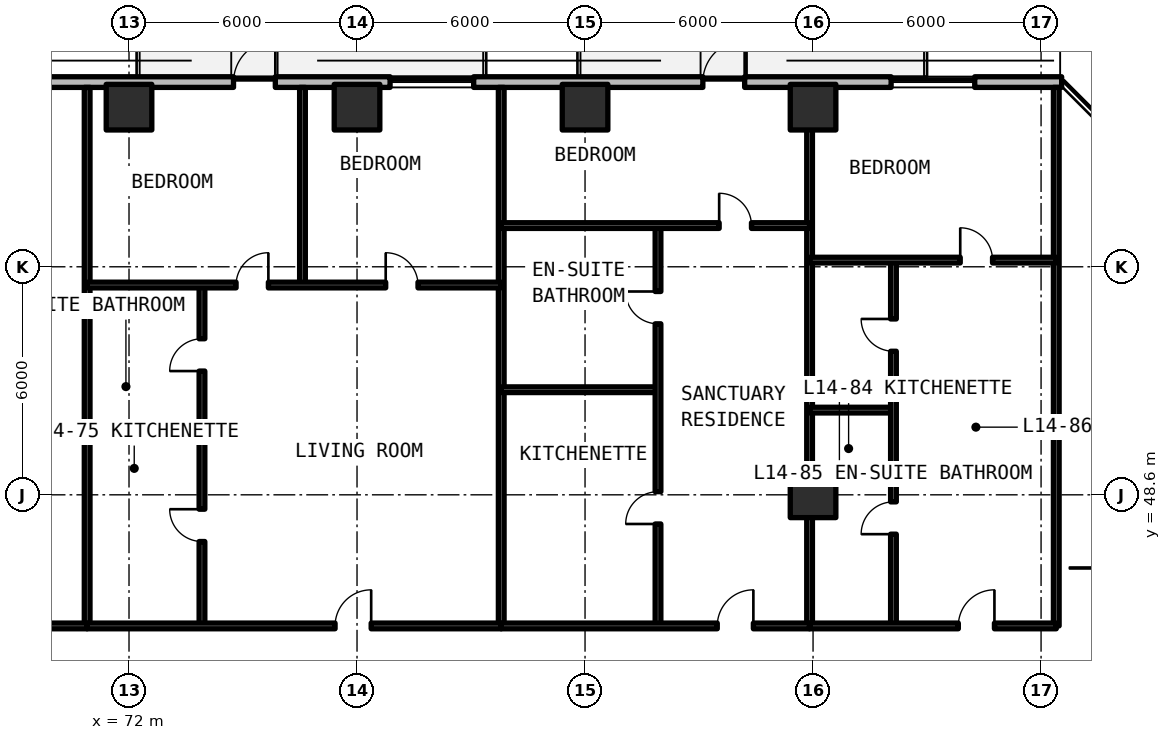
"""IFC4 building model, lengths in metres.
Left out: names, types, materials, properties, quantities, classifications, styles, units other than length and angle.
Written with IfcOpenShell. Run it as: python <this file> out.ifc"""

import sys

from ifc_helpers import new_model, si_unit, direction, frame, frame_2d, origin, origin_2d, place, context, subcontext, project, spatial, rectangle, extrude, element, fill, save


model = new_model("IFC4")
c1 = context("Model", 3, precision=1e-05, world=origin(), true_north=direction((0.0, 1.0)))
c2 = subcontext(c1, "Body", "Model", "MODEL_VIEW")
j1 = project(units=[si_unit("LENGTHUNIT", "METRE"), si_unit("PLANEANGLEUNIT", "RADIAN")], contexts=[c1])
p1 = place(None, origin())
s1 = spatial("IfcSite", under=j1, at=p1, CompositionType="ELEMENT")
p2 = place(p1, origin())
s2 = spatial("IfcBuilding", under=s1, at=p2, CompositionType="ELEMENT")
p3 = place(p2, frame((0.0, 0.0, 52.14)))
s3 = spatial("IfcBuildingStorey", under=s2, at=p3, CompositionType="ELEMENT", Elevation=52.14)
for number, where, z_axis, x_axis in (
    (1, (90.0, 48.6, 0.0), (0.0, 0.0, 1.0), (1.0, 0.0, 0.0)),
    (2, (72.0, 58.8, 0.0), (0.0, 0.0, 1.0), (1.0, 0.0, 0.0)),
    (3, (78.0, 58.8, 0.0), (0.0, 0.0, 1.0), (1.0, 0.0, 0.0)),
    (4, (84.0, 58.8, 0.0), (0.0, 0.0, 1.0), (1.0, 0.0, 0.0)),
    (5, (90.0, 58.8, 0.0), (0.0, 0.0, 1.0), (1.0, 0.0, 0.0)),
):
    element("IfcColumn", number, at=place(p3, frame(where, z_axis=z_axis, x_axis=x_axis)), inside=s3, PredefinedType="COLUMN", context=c2, shape_type="SweptSolid", body=[
        extrude(rectangle(XDim=1.2, YDim=1.2, at=origin_2d()), origin(), (0.0, 0.0, 1.0), 3.3),
    ])
p4 = place(p3, frame((96.542, 59.46, 0.0), z_axis=(0.0, 0.0, 1.0), x_axis=(-1.0, 0.0, 0.0)))
e6 = element("IfcWall", 6, at=p4, inside=s3, PredefinedType="SOLIDWALL", context=c2, shape_type="SweptSolid", body=[
    extrude(rectangle(XDim=44.402, YDim=0.28, at=frame_2d((22.201, 0.0))), origin(), (0.0, 0.0, 1.0), 3.08),
])
p5 = place(p4, frame((32.292, 0.0, 0.0)))
e7 = element("IfcOpeningElement", 7, at=p5, cuts=e6, PredefinedType="OPENING", context=c2, shape_type="SweptSolid", body=[
    extrude(rectangle(XDim=1.1, YDim=2.15, at=frame_2d((0.55, 1.075))), frame((0.0, 0.15, 0.0), z_axis=(0.0, -1.0, 0.0), x_axis=(1.0, 0.0, 0.0)), (0.0, 0.0, 1.0), 0.3),
])
p6 = place(p4, frame((20.692, 0.0, 0.0)))
e8 = element("IfcOpeningElement", 8, at=p6, cuts=e6, PredefinedType="OPENING", context=c2, shape_type="SweptSolid", body=[
    extrude(rectangle(XDim=1.1, YDim=2.15, at=frame_2d((0.55, 1.075))), frame((0.0, 0.15, 0.0), z_axis=(0.0, -1.0, 0.0), x_axis=(1.0, 0.0, 0.0)), (0.0, 0.0, 1.0), 0.3),
])
p7 = place(p4, frame((8.342, 0.0, 0.0)))
e9 = element("IfcOpeningElement", 9, at=p7, cuts=e6, PredefinedType="OPENING", context=c2, shape_type="SweptSolid", body=[
    extrude(rectangle(XDim=1.1, YDim=2.15, at=frame_2d((0.55, 1.075))), frame((0.0, 0.15, 0.0), z_axis=(0.0, -1.0, 0.0), x_axis=(1.0, 0.0, 0.0)), (0.0, 0.0, 1.0), 0.3),
])
p8 = place(p4, frame((39.502, 0.0, 0.78)))
e10 = element("IfcOpeningElement", 10, at=p8, cuts=e6, PredefinedType="OPENING", context=c2, shape_type="SweptSolid", body=[
    extrude(rectangle(XDim=2.2, YDim=1.66, at=frame_2d((1.1, 0.83))), frame((0.0, 0.15, 0.0), z_axis=(0.0, -1.0, 0.0), x_axis=(1.0, 0.0, 0.0)), (0.0, 0.0, 1.0), 0.3),
])
p9 = place(p4, frame((34.821, 0.0, 0.78)))
e11 = element("IfcOpeningElement", 11, at=p9, cuts=e6, PredefinedType="OPENING", context=c2, shape_type="SweptSolid", body=[
    extrude(rectangle(XDim=0.85, YDim=1.65, at=frame_2d((0.425, 0.825))), frame((0.0, 0.15, 0.0), z_axis=(0.0, -1.0, 0.0), x_axis=(1.0, 0.0, 0.0)), (0.0, 0.0, 1.0), 0.3),
])
p10 = place(p4, frame((15.472, 0.0, 0.78)))
e12 = element("IfcOpeningElement", 12, at=p10, cuts=e6, PredefinedType="OPENING", context=c2, shape_type="SweptSolid", body=[
    extrude(rectangle(XDim=2.2, YDim=1.66, at=frame_2d((1.1, 0.83))), frame((0.0, 0.15, 0.0), z_axis=(0.0, -1.0, 0.0), x_axis=(1.0, 0.0, 0.0)), (0.0, 0.0, 1.0), 0.3),
])
p11 = place(p4, frame((2.288, 0.0, 0.78)))
e13 = element("IfcOpeningElement", 13, at=p11, cuts=e6, PredefinedType="OPENING", context=c2, shape_type="SweptSolid", body=[
    extrude(rectangle(XDim=2.2, YDim=1.66, at=frame_2d((1.1, 0.83))), frame((0.0, 0.15, 0.0), z_axis=(0.0, -1.0, 0.0), x_axis=(1.0, 0.0, 0.0)), (0.0, 0.0, 1.0), 0.3),
])
for number, where, z_axis, x_axis in (
    (14, (96.4, 45.15, 0.0), (0.0, 0.0, 1.0), (0.0, 1.0, 0.0)),
    (15, (70.898, 45.15, 0.0), (0.0, 0.0, 1.0), (0.0, 1.0, 0.0)),
):
    element("IfcWall", number, at=place(p3, frame(where, z_axis=z_axis, x_axis=x_axis)), inside=s3, PredefinedType="SOLIDWALL", context=c2, shape_type="SweptSolid", body=[
        extrude(rectangle(XDim=14.17, YDim=0.15, at=frame_2d((7.085, 0.0))), origin(), (0.0, 0.0, 1.0), 2.35),
    ])
p12 = place(p3, frame((62.552, 45.15, 0.0), z_axis=(0.0, 0.0, 1.0), x_axis=(1.0, 0.0, 0.0)))
e16 = element("IfcWall", 16, at=p12, inside=s3, PredefinedType="SOLIDWALL", context=c2, shape_type="SweptSolid", body=[
    extrude(rectangle(XDim=8.346, YDim=0.15, at=frame_2d((4.173, 0.0))), origin(), (0.0, 0.0, 1.0), 2.35),
])
p13 = place(p12, frame((3.623, 0.0, 0.0)))
e17 = element("IfcOpeningElement", 17, at=p13, cuts=e16, PredefinedType="OPENING", context=c2, shape_type="SweptSolid", body=[
    extrude(rectangle(XDim=1.1, YDim=2.15, at=frame_2d((0.55, 1.075))), frame((0.0, 0.085, 0.0), z_axis=(0.0, -1.0, 0.0), x_axis=(1.0, 0.0, 0.0)), (0.0, 0.0, 1.0), 0.17),
])
p14 = place(p3, frame((81.795, 45.15, 0.0), z_axis=(0.0, 0.0, 1.0), x_axis=(0.0, 1.0, 0.0)))
e18 = element("IfcWall", 18, at=p14, inside=s3, PredefinedType="SOLIDWALL", context=c2, shape_type="SweptSolid", body=[
    extrude(rectangle(XDim=14.17, YDim=0.15, at=frame_2d((7.085, 0.0))), origin(), (0.0, 0.0, 1.0), 2.35),
])
p15 = place(p3, frame((70.898, 50.442, 0.0), z_axis=(0.0, 0.0, 1.0), x_axis=(1.0, 0.0, 0.0)))
e19 = element("IfcWall", 19, at=p15, inside=s3, PredefinedType="PARTITIONING", context=c2, shape_type="SweptSolid", body=[
    extrude(rectangle(XDim=3.021, YDim=0.15, at=frame_2d((1.511, 0.0))), origin(), (0.0, 0.0, 1.0), 2.35),
])
p16 = place(p3, frame((73.92, 45.15, 0.0), z_axis=(0.0, 0.0, 1.0), x_axis=(0.0, 1.0, 0.0)))
e20 = element("IfcWall", 20, at=p16, inside=s3, PredefinedType="PARTITIONING", context=c2, shape_type="SweptSolid", body=[
    extrude(rectangle(XDim=8.97, YDim=0.15, at=frame_2d((4.485, 0.0))), origin(), (0.0, 0.0, 1.0), 2.35),
])
p17 = place(p16, frame((2.221, 0.0, 0.0)))
e21 = element("IfcOpeningElement", 21, at=p17, cuts=e20, PredefinedType="OPENING", context=c2, shape_type="SweptSolid", body=[
    extrude(rectangle(XDim=0.85, YDim=2.1, at=frame_2d((0.425, 1.05))), frame((0.0, 0.085, 0.0), z_axis=(0.0, -1.0, 0.0), x_axis=(1.0, 0.0, 0.0)), (0.0, 0.0, 1.0), 0.17),
])
p18 = place(p16, frame((6.706, 0.0, 0.0)))
e22 = element("IfcOpeningElement", 22, at=p18, cuts=e20, PredefinedType="OPENING", context=c2, shape_type="SweptSolid", body=[
    extrude(rectangle(XDim=0.85, YDim=2.1, at=frame_2d((0.425, 1.05))), frame((0.0, 0.085, 0.0), z_axis=(0.0, -1.0, 0.0), x_axis=(1.0, 0.0, 0.0)), (0.0, 0.0, 1.0), 0.17),
])
p19 = place(p3, frame((76.564, 54.12, 0.0), z_axis=(0.0, 0.0, 1.0), x_axis=(0.0, 1.0, 0.0)))
e23 = element("IfcWall", 23, at=p19, inside=s3, PredefinedType="PARTITIONING", context=c2, shape_type="SweptSolid", body=[
    extrude(rectangle(XDim=5.2, YDim=0.15, at=frame_2d((2.6, 0.0))), origin(), (0.0, 0.0, 1.0), 2.35),
])
p20 = place(p3, frame((70.898, 54.12, 0.0), z_axis=(0.0, 0.0, 1.0), x_axis=(1.0, 0.0, 0.0)))
e24 = element("IfcWall", 24, at=p20, inside=s3, PredefinedType="PARTITIONING", context=c2, shape_type="SweptSolid", body=[
    extrude(rectangle(XDim=10.896, YDim=0.15, at=frame_2d((5.448, 0.0))), origin(), (0.0, 0.0, 1.0), 2.35),
])
p21 = place(p20, frame((3.919, 0.0, 0.0)))
e25 = element("IfcOpeningElement", 25, at=p21, cuts=e24, PredefinedType="OPENING", context=c2, shape_type="SweptSolid", body=[
    extrude(rectangle(XDim=0.85, YDim=2.1, at=frame_2d((0.425, 1.05))), frame((0.0, 0.085, 0.0), z_axis=(0.0, -1.0, 0.0), x_axis=(1.0, 0.0, 0.0)), (0.0, 0.0, 1.0), 0.17),
])
p22 = place(p20, frame((7.856, 0.0, 0.0)))
e26 = element("IfcOpeningElement", 26, at=p22, cuts=e24, PredefinedType="OPENING", context=c2, shape_type="SweptSolid", body=[
    extrude(rectangle(XDim=0.85, YDim=2.1, at=frame_2d((0.425, 1.05))), frame((0.0, 0.085, 0.0), z_axis=(0.0, -1.0, 0.0), x_axis=(1.0, 0.0, 0.0)), (0.0, 0.0, 1.0), 0.17),
])
p23 = place(p3, frame((70.898, 45.15, 0.0), z_axis=(0.0, 0.0, 1.0), x_axis=(1.0, 0.0, 0.0)))
e27 = element("IfcWall", 27, at=p23, inside=s3, PredefinedType="SOLIDWALL", context=c2, shape_type="SweptSolid", body=[
    extrude(rectangle(XDim=10.896, YDim=0.15, at=frame_2d((5.448, 0.0))), origin(), (0.0, 0.0, 1.0), 2.35),
])
p24 = place(p23, frame((6.524, 0.0, 0.0)))
e28 = element("IfcOpeningElement", 28, at=p24, cuts=e27, PredefinedType="OPENING", context=c2, shape_type="SweptSolid", body=[
    extrude(rectangle(XDim=0.95, YDim=2.15, at=frame_2d((0.475, 1.075))), frame((0.0, 0.085, 0.0), z_axis=(0.0, -1.0, 0.0), x_axis=(1.0, 0.0, 0.0)), (0.0, 0.0, 1.0), 0.17),
])
p25 = place(p3, frame((89.909, 45.15, 0.0), z_axis=(0.0, 0.0, 1.0), x_axis=(0.0, 1.0, 0.0)))
e29 = element("IfcWall", 29, at=p25, inside=s3, PredefinedType="SOLIDWALL", context=c2, shape_type="SweptSolid", body=[
    extrude(rectangle(XDim=14.17, YDim=0.15, at=frame_2d((7.085, 0.0))), origin(), (0.0, 0.0, 1.0), 2.35),
])
p26 = place(p3, frame((81.795, 51.365, 0.0), z_axis=(0.0, 0.0, 1.0), x_axis=(1.0, 0.0, 0.0)))
e30 = element("IfcWall", 30, at=p26, inside=s3, PredefinedType="PARTITIONING", context=c2, shape_type="SweptSolid", body=[
    extrude(rectangle(XDim=4.125, YDim=0.15, at=frame_2d((2.062, 0.0))), origin(), (0.0, 0.0, 1.0), 2.35),
])
p27 = place(p3, frame((85.92, 45.15, 0.0), z_axis=(0.0, 0.0, 1.0), x_axis=(0.0, 1.0, 0.0)))
e31 = element("IfcWall", 31, at=p27, inside=s3, PredefinedType="PARTITIONING", context=c2, shape_type="SweptSolid", body=[
    extrude(rectangle(XDim=10.534, YDim=0.15, at=frame_2d((5.267, 0.0))), origin(), (0.0, 0.0, 1.0), 2.35),
])
p28 = place(p27, frame((2.683, 0.0, 0.0)))
e32 = element("IfcOpeningElement", 32, at=p28, cuts=e31, PredefinedType="OPENING", context=c2, shape_type="SweptSolid", body=[
    extrude(rectangle(XDim=0.85, YDim=2.1, at=frame_2d((0.425, 1.05))), frame((0.0, 0.085, 0.0), z_axis=(0.0, -1.0, 0.0), x_axis=(1.0, 0.0, 0.0)), (0.0, 0.0, 1.0), 0.17),
])
p29 = place(p27, frame((7.95, 0.0, 0.0)))
e33 = element("IfcOpeningElement", 33, at=p29, cuts=e31, PredefinedType="OPENING", context=c2, shape_type="SweptSolid", body=[
    extrude(rectangle(XDim=0.85, YDim=2.1, at=frame_2d((0.425, 1.05))), frame((0.0, 0.085, 0.0), z_axis=(0.0, -1.0, 0.0), x_axis=(1.0, 0.0, 0.0)), (0.0, 0.0, 1.0), 0.17),
])
p30 = place(p3, frame((81.795, 55.684, 0.0), z_axis=(0.0, 0.0, 1.0), x_axis=(1.0, 0.0, 0.0)))
e34 = element("IfcWall", 34, at=p30, inside=s3, PredefinedType="PARTITIONING", context=c2, shape_type="SweptSolid", body=[
    extrude(rectangle(XDim=8.114, YDim=0.15, at=frame_2d((4.057, 0.0))), origin(), (0.0, 0.0, 1.0), 2.35),
])
p31 = place(p30, frame((5.735, 0.0, 0.0)))
e35 = element("IfcOpeningElement", 35, at=p31, cuts=e34, PredefinedType="OPENING", context=c2, shape_type="SweptSolid", body=[
    extrude(rectangle(XDim=0.85, YDim=2.1, at=frame_2d((0.425, 1.05))), frame((0.0, 0.085, 0.0), z_axis=(0.0, -1.0, 0.0), x_axis=(1.0, 0.0, 0.0)), (0.0, 0.0, 1.0), 0.17),
])
p32 = place(p3, frame((81.795, 45.15, 0.0), z_axis=(0.0, 0.0, 1.0), x_axis=(1.0, 0.0, 0.0)))
e36 = element("IfcWall", 36, at=p32, inside=s3, PredefinedType="SOLIDWALL", context=c2, shape_type="SweptSolid", body=[
    extrude(rectangle(XDim=8.114, YDim=0.15, at=frame_2d((4.057, 0.0))), origin(), (0.0, 0.0, 1.0), 2.35),
])
p33 = place(p32, frame((5.685, 0.0, 0.0)))
e37 = element("IfcOpeningElement", 37, at=p33, cuts=e36, PredefinedType="OPENING", context=c2, shape_type="SweptSolid", body=[
    extrude(rectangle(XDim=0.95, YDim=2.15, at=frame_2d((0.475, 1.075))), frame((0.0, 0.085, 0.0), z_axis=(0.0, -1.0, 0.0), x_axis=(1.0, 0.0, 0.0)), (0.0, 0.0, 1.0), 0.17),
])
p34 = place(p3, frame((89.909, 50.829, 0.0), z_axis=(0.0, 0.0, 1.0), x_axis=(1.0, 0.0, 0.0)))
e38 = element("IfcWall", 38, at=p34, inside=s3, PredefinedType="PARTITIONING", context=c2, shape_type="SweptSolid", body=[
    extrude(rectangle(XDim=2.207, YDim=0.15, at=frame_2d((1.104, 0.0))), origin(), (0.0, 0.0, 1.0), 2.35),
])
p35 = place(p3, frame((92.116, 45.15, 0.0), z_axis=(0.0, 0.0, 1.0), x_axis=(0.0, 1.0, 0.0)))
e39 = element("IfcWall", 39, at=p35, inside=s3, PredefinedType="PARTITIONING", context=c2, shape_type="SweptSolid", body=[
    extrude(rectangle(XDim=9.625, YDim=0.15, at=frame_2d((4.813, 0.0))), origin(), (0.0, 0.0, 1.0), 2.35),
])
p36 = place(p35, frame((2.415, 0.0, 0.0)))
e40 = element("IfcOpeningElement", 40, at=p36, cuts=e39, PredefinedType="OPENING", context=c2, shape_type="SweptSolid", body=[
    extrude(rectangle(XDim=0.85, YDim=2.1, at=frame_2d((0.425, 1.05))), frame((0.0, 0.085, 0.0), z_axis=(0.0, -1.0, 0.0), x_axis=(1.0, 0.0, 0.0)), (0.0, 0.0, 1.0), 0.17),
])
p37 = place(p35, frame((7.227, 0.0, 0.0)))
e41 = element("IfcOpeningElement", 41, at=p37, cuts=e39, PredefinedType="OPENING", context=c2, shape_type="SweptSolid", body=[
    extrude(rectangle(XDim=0.85, YDim=2.1, at=frame_2d((0.425, 1.05))), frame((0.0, 0.085, 0.0), z_axis=(0.0, -1.0, 0.0), x_axis=(1.0, 0.0, 0.0)), (0.0, 0.0, 1.0), 0.17),
])
p38 = place(p3, frame((89.909, 54.775, 0.0), z_axis=(0.0, 0.0, 1.0), x_axis=(1.0, 0.0, 0.0)))
e42 = element("IfcWall", 42, at=p38, inside=s3, PredefinedType="PARTITIONING", context=c2, shape_type="SweptSolid", body=[
    extrude(rectangle(XDim=6.491, YDim=0.15, at=frame_2d((3.246, 0.0))), origin(), (0.0, 0.0, 1.0), 2.35),
])
p39 = place(p38, frame((3.964, 0.0, 0.0)))
e43 = element("IfcOpeningElement", 43, at=p39, cuts=e42, PredefinedType="OPENING", context=c2, shape_type="SweptSolid", body=[
    extrude(rectangle(XDim=0.85, YDim=2.1, at=frame_2d((0.425, 1.05))), frame((0.0, 0.085, 0.0), z_axis=(0.0, -1.0, 0.0), x_axis=(1.0, 0.0, 0.0)), (0.0, 0.0, 1.0), 0.17),
])
p40 = place(p3, frame((89.909, 45.15, 0.0), z_axis=(0.0, 0.0, 1.0), x_axis=(1.0, 0.0, 0.0)))
e44 = element("IfcWall", 44, at=p40, inside=s3, PredefinedType="SOLIDWALL", context=c2, shape_type="SweptSolid", body=[
    extrude(rectangle(XDim=6.491, YDim=0.15, at=frame_2d((3.246, 0.0))), origin(), (0.0, 0.0, 1.0), 2.35),
])
p41 = place(p40, frame((3.914, 0.0, 0.0)))
e45 = element("IfcOpeningElement", 45, at=p41, cuts=e44, PredefinedType="OPENING", context=c2, shape_type="SweptSolid", body=[
    extrude(rectangle(XDim=0.95, YDim=2.15, at=frame_2d((0.475, 1.075))), frame((0.0, 0.085, 0.0), z_axis=(0.0, -1.0, 0.0), x_axis=(1.0, 0.0, 0.0)), (0.0, 0.0, 1.0), 0.17),
])
p42 = place(p6, frame((1.1, 0.0, 0.0), z_axis=(0.0, 0.0, 1.0), x_axis=(-1.0, 0.0, 0.0)))
e46 = element("IfcDoor", 46, at=p42, inside=s3, OperationType="SINGLE_SWING_RIGHT", PredefinedType="DOOR", context=c2, shape_type="SweptSolid", body=[
    extrude(rectangle(XDim=1.1, YDim=2.15, at=frame_2d((0.55, 1.075))), frame((0.0, 0.025, 0.0), z_axis=(0.0, -1.0, 0.0), x_axis=(1.0, 0.0, 0.0)), (0.0, 0.0, 1.0), 0.05),
])
fill(e8, e46)
p43 = place(p7, frame((1.1, 0.0, 0.0), z_axis=(0.0, 0.0, 1.0), x_axis=(-1.0, 0.0, 0.0)))
e47 = element("IfcDoor", 47, at=p43, inside=s3, OperationType="SINGLE_SWING_LEFT", PredefinedType="DOOR", context=c2, shape_type="SweptSolid", body=[
    extrude(rectangle(XDim=1.1, YDim=2.15, at=frame_2d((0.55, 1.075))), frame((0.0, 0.025, 0.0), z_axis=(0.0, -1.0, 0.0), x_axis=(1.0, 0.0, 0.0)), (0.0, 0.0, 1.0), 0.05),
])
fill(e9, e47)
p44 = place(p10, origin())
e48 = element("IfcWindow", 48, at=p44, inside=s3, PartitioningType="SINGLE_PANEL", PredefinedType="WINDOW", context=c2, shape_type="SweptSolid", body=[
    extrude(rectangle(XDim=2.2, YDim=1.66, at=frame_2d((1.1, 0.83))), frame((0.0, 0.03, 0.0), z_axis=(0.0, -1.0, 0.0), x_axis=(1.0, 0.0, 0.0)), (0.0, 0.0, 1.0), 0.06),
])
fill(e12, e48)
p45 = place(p11, origin())
e49 = element("IfcWindow", 49, at=p45, inside=s3, PartitioningType="SINGLE_PANEL", PredefinedType="WINDOW", context=c2, shape_type="SweptSolid", body=[
    extrude(rectangle(XDim=2.2, YDim=1.66, at=frame_2d((1.1, 0.83))), frame((0.0, 0.03, 0.0), z_axis=(0.0, -1.0, 0.0), x_axis=(1.0, 0.0, 0.0)), (0.0, 0.0, 1.0), 0.06),
])
fill(e13, e49)
p46 = place(p17, origin())
e50 = element("IfcDoor", 50, at=p46, inside=s3, OperationType="SINGLE_SWING_RIGHT", PredefinedType="DOOR", context=c2, shape_type="SweptSolid", body=[
    extrude(rectangle(XDim=0.85, YDim=2.1, at=frame_2d((0.425, 1.05))), frame((0.0, 0.025, 0.0), z_axis=(0.0, -1.0, 0.0), x_axis=(1.0, 0.0, 0.0)), (0.0, 0.0, 1.0), 0.05),
])
fill(e21, e50)
p47 = place(p18, origin())
e51 = element("IfcDoor", 51, at=p47, inside=s3, OperationType="SINGLE_SWING_LEFT", PredefinedType="DOOR", context=c2, shape_type="SweptSolid", body=[
    extrude(rectangle(XDim=0.85, YDim=2.1, at=frame_2d((0.425, 1.05))), frame((0.0, 0.025, 0.0), z_axis=(0.0, -1.0, 0.0), x_axis=(1.0, 0.0, 0.0)), (0.0, 0.0, 1.0), 0.05),
])
fill(e22, e51)
p48 = place(p21, origin())
e52 = element("IfcDoor", 52, at=p48, inside=s3, OperationType="SINGLE_SWING_RIGHT", PredefinedType="DOOR", context=c2, shape_type="SweptSolid", body=[
    extrude(rectangle(XDim=0.85, YDim=2.1, at=frame_2d((0.425, 1.05))), frame((0.0, 0.025, 0.0), z_axis=(0.0, -1.0, 0.0), x_axis=(1.0, 0.0, 0.0)), (0.0, 0.0, 1.0), 0.05),
])
fill(e25, e52)
p49 = place(p22, origin())
e53 = element("IfcDoor", 53, at=p49, inside=s3, OperationType="SINGLE_SWING_LEFT", PredefinedType="DOOR", context=c2, shape_type="SweptSolid", body=[
    extrude(rectangle(XDim=0.85, YDim=2.1, at=frame_2d((0.425, 1.05))), frame((0.0, 0.025, 0.0), z_axis=(0.0, -1.0, 0.0), x_axis=(1.0, 0.0, 0.0)), (0.0, 0.0, 1.0), 0.05),
])
fill(e26, e53)
p50 = place(p24, origin())
e54 = element("IfcDoor", 54, at=p50, inside=s3, OperationType="SINGLE_SWING_RIGHT", PredefinedType="DOOR", context=c2, shape_type="SweptSolid", body=[
    extrude(rectangle(XDim=0.95, YDim=2.15, at=frame_2d((0.475, 1.075))), frame((0.0, 0.025, 0.0), z_axis=(0.0, -1.0, 0.0), x_axis=(1.0, 0.0, 0.0)), (0.0, 0.0, 1.0), 0.05),
])
fill(e28, e54)
p51 = place(p28, origin())
e55 = element("IfcDoor", 55, at=p51, inside=s3, OperationType="SINGLE_SWING_LEFT", PredefinedType="DOOR", context=c2, shape_type="SweptSolid", body=[
    extrude(rectangle(XDim=0.85, YDim=2.1, at=frame_2d((0.425, 1.05))), frame((0.0, 0.025, 0.0), z_axis=(0.0, -1.0, 0.0), x_axis=(1.0, 0.0, 0.0)), (0.0, 0.0, 1.0), 0.05),
])
fill(e32, e55)
p52 = place(p29, origin())
e56 = element("IfcDoor", 56, at=p52, inside=s3, OperationType="SINGLE_SWING_RIGHT", PredefinedType="DOOR", context=c2, shape_type="SweptSolid", body=[
    extrude(rectangle(XDim=0.85, YDim=2.1, at=frame_2d((0.425, 1.05))), frame((0.0, 0.025, 0.0), z_axis=(0.0, -1.0, 0.0), x_axis=(1.0, 0.0, 0.0)), (0.0, 0.0, 1.0), 0.05),
])
fill(e33, e56)
p53 = place(p31, origin())
e57 = element("IfcDoor", 57, at=p53, inside=s3, OperationType="SINGLE_SWING_LEFT", PredefinedType="DOOR", context=c2, shape_type="SweptSolid", body=[
    extrude(rectangle(XDim=0.85, YDim=2.1, at=frame_2d((0.425, 1.05))), frame((0.0, 0.025, 0.0), z_axis=(0.0, -1.0, 0.0), x_axis=(1.0, 0.0, 0.0)), (0.0, 0.0, 1.0), 0.05),
])
fill(e35, e57)
p54 = place(p33, origin())
e58 = element("IfcDoor", 58, at=p54, inside=s3, OperationType="SINGLE_SWING_RIGHT", PredefinedType="DOOR", context=c2, shape_type="SweptSolid", body=[
    extrude(rectangle(XDim=0.95, YDim=2.15, at=frame_2d((0.475, 1.075))), frame((0.0, 0.025, 0.0), z_axis=(0.0, -1.0, 0.0), x_axis=(1.0, 0.0, 0.0)), (0.0, 0.0, 1.0), 0.05),
])
fill(e37, e58)
p55 = place(p36, origin())
e59 = element("IfcDoor", 59, at=p55, inside=s3, OperationType="SINGLE_SWING_LEFT", PredefinedType="DOOR", context=c2, shape_type="SweptSolid", body=[
    extrude(rectangle(XDim=0.85, YDim=2.1, at=frame_2d((0.425, 1.05))), frame((0.0, 0.025, 0.0), z_axis=(0.0, -1.0, 0.0), x_axis=(1.0, 0.0, 0.0)), (0.0, 0.0, 1.0), 0.05),
])
fill(e40, e59)
p56 = place(p37, origin())
e60 = element("IfcDoor", 60, at=p56, inside=s3, OperationType="SINGLE_SWING_RIGHT", PredefinedType="DOOR", context=c2, shape_type="SweptSolid", body=[
    extrude(rectangle(XDim=0.85, YDim=2.1, at=frame_2d((0.425, 1.05))), frame((0.0, 0.025, 0.0), z_axis=(0.0, -1.0, 0.0), x_axis=(1.0, 0.0, 0.0)), (0.0, 0.0, 1.0), 0.05),
])
fill(e41, e60)
p57 = place(p39, origin())
e61 = element("IfcDoor", 61, at=p57, inside=s3, OperationType="SINGLE_SWING_LEFT", PredefinedType="DOOR", context=c2, shape_type="SweptSolid", body=[
    extrude(rectangle(XDim=0.85, YDim=2.1, at=frame_2d((0.425, 1.05))), frame((0.0, 0.025, 0.0), z_axis=(0.0, -1.0, 0.0), x_axis=(1.0, 0.0, 0.0)), (0.0, 0.0, 1.0), 0.05),
])
fill(e43, e61)
p58 = place(p41, origin())
e62 = element("IfcDoor", 62, at=p58, inside=s3, OperationType="SINGLE_SWING_RIGHT", PredefinedType="DOOR", context=c2, shape_type="SweptSolid", body=[
    extrude(rectangle(XDim=0.95, YDim=2.15, at=frame_2d((0.475, 1.075))), frame((0.0, 0.025, 0.0), z_axis=(0.0, -1.0, 0.0), x_axis=(1.0, 0.0, 0.0)), (0.0, 0.0, 1.0), 0.05),
])
fill(e45, e62)
save(model, sys.argv[1])
